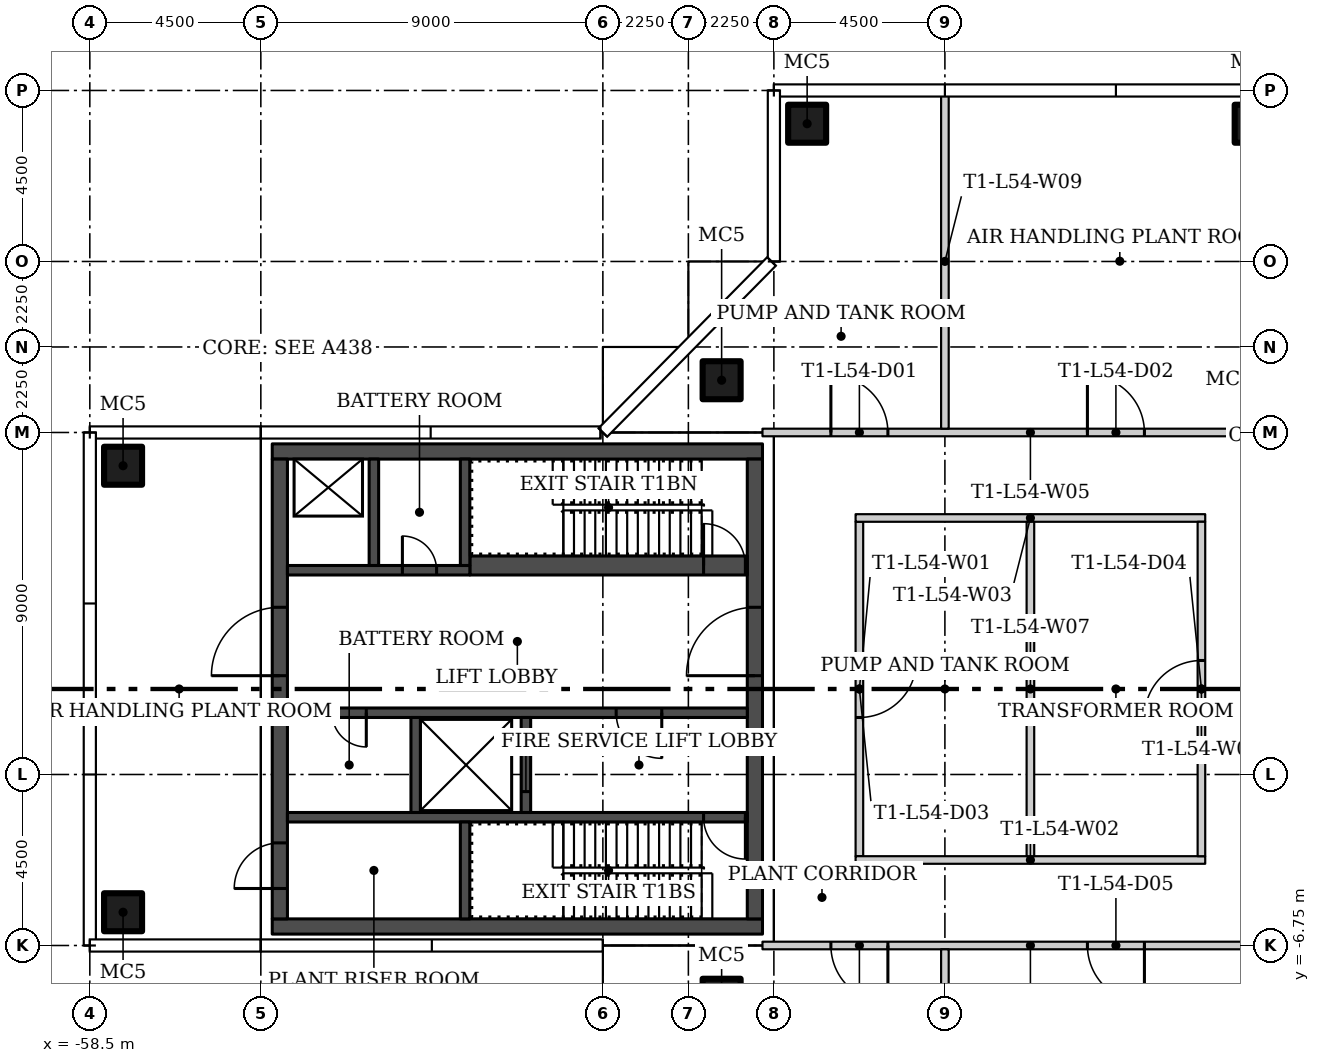
"""IFC4 building model, lengths in metres.
Left out: names, types, materials, properties, quantities, classifications, styles, units other than length and angle.
Written with IfcOpenShell. Run it as: python <this file> out.ifc"""

import sys

from ifc_helpers import new_model, si_unit, direction, frame, frame_2d, origin, origin_2d, place, context, subcontext, project, spatial, rectangle, hollow_rectangle, extrude, element, fill, save


model = new_model("IFC4")
c1 = context("Model", 3, precision=1e-05, world=origin(), true_north=direction((0.0, 1.0)))
c2 = subcontext(c1, "Body", "Model", "MODEL_VIEW")
j1 = project(units=[si_unit("LENGTHUNIT", "METRE"), si_unit("PLANEANGLEUNIT", "RADIAN")], contexts=[c1])
p1 = place(None, origin())
s1 = spatial("IfcSite", under=j1, at=p1, CompositionType="ELEMENT")
p2 = place(p1, origin())
s2 = spatial("IfcBuilding", under=s1, at=p2, CompositionType="ELEMENT")
p3 = place(p2, frame((0.0, 0.0, 225.6)))
s3 = spatial("IfcBuildingStorey", under=s2, at=p3, CompositionType="ELEMENT", Elevation=225.6)
for number, where in (
    (1, (-41.875, 8.125, 0.0)),
    (2, (-41.875, -8.125, 0.0)),
    (3, (-57.625, -5.875, 0.0)),
    (4, (-57.625, 5.875, 0.0)),
    (5, (-39.625, 14.875, 0.0)),
    (6, (-27.875, 14.875, 0.0)),
):
    element("IfcColumn", number, at=place(p3, frame(where)), inside=s3, PredefinedType="COLUMN", context=c2, shape_type="SweptSolid", body=[
        extrude(hollow_rectangle(XDim=1.0, YDim=1.0, WallThickness=0.04, at=origin_2d()), origin(), (0.0, 0.0, 1.0), 4.45),
    ])
p4 = place(p3, frame((-38.25, 4.4, 0.0), z_axis=(0.0, 0.0, 1.0), x_axis=(0.0, -1.0, 0.0)))
e7 = element("IfcWall", 7, at=p4, inside=s3, PredefinedType="PARTITIONING", context=c2, shape_type="SweptSolid", body=[
    extrude(rectangle(XDim=8.8, YDim=0.2, at=frame_2d((4.4, 0.0))), origin(), (0.0, 0.0, 1.0), 4.45),
])
p5 = place(p4, frame((3.65, 0.0, 0.0)))
e8 = element("IfcOpeningElement", 8, at=p5, cuts=e7, PredefinedType="OPENING", context=c2, shape_type="SweptSolid", body=[
    extrude(rectangle(XDim=1.5, YDim=2.4, at=frame_2d((0.75, 1.2))), frame((0.0, 0.11, 0.0), z_axis=(0.0, -1.0, 0.0), x_axis=(1.0, 0.0, 0.0)), (0.0, 0.0, 1.0), 0.22),
])
p6 = place(p3, frame((-38.35, -4.5, 0.0)))
e9 = element("IfcWall", 9, at=p6, inside=s3, PredefinedType="PARTITIONING", context=c2, shape_type="SweptSolid", body=[
    extrude(rectangle(XDim=9.2, YDim=0.2, at=frame_2d((4.6, 0.0))), origin(), (0.0, 0.0, 1.0), 4.45),
])
p7 = place(p3, frame((-29.15, 4.5, 0.0), z_axis=(0.0, 0.0, 1.0), x_axis=(-1.0, 0.0, 0.0)))
e10 = element("IfcWall", 10, at=p7, inside=s3, PredefinedType="PARTITIONING", context=c2, shape_type="SweptSolid", body=[
    extrude(rectangle(XDim=9.2, YDim=0.2, at=frame_2d((4.6, 0.0))), origin(), (0.0, 0.0, 1.0), 4.45),
])
p8 = place(p3, frame((-29.25, -4.4, 0.0), z_axis=(0.0, 0.0, 1.0), x_axis=(0.0, 1.0, 0.0)))
e11 = element("IfcWall", 11, at=p8, inside=s3, PredefinedType="PARTITIONING", context=c2, shape_type="SweptSolid", body=[
    extrude(rectangle(XDim=8.8, YDim=0.2, at=frame_2d((4.4, 0.0))), origin(), (0.0, 0.0, 1.0), 4.45),
])
p9 = place(p8, frame((3.65, 0.0, 0.0)))
e12 = element("IfcOpeningElement", 12, at=p9, cuts=e11, PredefinedType="OPENING", context=c2, shape_type="SweptSolid", body=[
    extrude(rectangle(XDim=1.5, YDim=2.4, at=frame_2d((0.75, 1.2))), frame((0.0, 0.11, 0.0), z_axis=(0.0, -1.0, 0.0), x_axis=(1.0, 0.0, 0.0)), (0.0, 0.0, 1.0), 0.22),
])
p10 = place(p3, frame((-40.8, 6.75, 0.0)))
e13 = element("IfcWall", 13, at=p10, inside=s3, PredefinedType="PARTITIONING", context=c2, shape_type="SweptSolid", body=[
    extrude(rectangle(XDim=14.1, YDim=0.2, at=frame_2d((7.05, 0.0))), origin(), (0.0, 0.0, 1.0), 4.45),
])
p11 = place(p10, frame((1.8, 0.0, 0.0)))
e14 = element("IfcOpeningElement", 14, at=p11, cuts=e13, PredefinedType="OPENING", context=c2, shape_type="SweptSolid", body=[
    extrude(rectangle(XDim=1.5, YDim=2.4, at=frame_2d((0.75, 1.2))), frame((0.0, 0.11, 0.0), z_axis=(0.0, -1.0, 0.0), x_axis=(1.0, 0.0, 0.0)), (0.0, 0.0, 1.0), 0.22),
])
p12 = place(p10, frame((8.55, 0.0, 0.0)))
e15 = element("IfcOpeningElement", 15, at=p12, cuts=e13, PredefinedType="OPENING", context=c2, shape_type="SweptSolid", body=[
    extrude(rectangle(XDim=1.5, YDim=2.4, at=frame_2d((0.75, 1.2))), frame((0.0, 0.11, 0.0), z_axis=(0.0, -1.0, 0.0), x_axis=(1.0, 0.0, 0.0)), (0.0, 0.0, 1.0), 0.22),
])
p13 = place(p3, frame((-26.7, -6.75, 0.0), z_axis=(0.0, 0.0, 1.0), x_axis=(-1.0, 0.0, 0.0)))
e16 = element("IfcWall", 16, at=p13, inside=s3, PredefinedType="PARTITIONING", context=c2, shape_type="SweptSolid", body=[
    extrude(rectangle(XDim=14.1, YDim=0.2, at=frame_2d((7.05, 0.0))), origin(), (0.0, 0.0, 1.0), 4.45),
])
p14 = place(p13, frame((4.05, 0.0, 0.0)))
e17 = element("IfcOpeningElement", 17, at=p14, cuts=e16, PredefinedType="OPENING", context=c2, shape_type="SweptSolid", body=[
    extrude(rectangle(XDim=1.5, YDim=2.4, at=frame_2d((0.75, 1.2))), frame((0.0, 0.11, 0.0), z_axis=(0.0, -1.0, 0.0), x_axis=(1.0, 0.0, 0.0)), (0.0, 0.0, 1.0), 0.22),
])
p15 = place(p13, frame((10.8, 0.0, 0.0)))
e18 = element("IfcOpeningElement", 18, at=p15, cuts=e16, PredefinedType="OPENING", context=c2, shape_type="SweptSolid", body=[
    extrude(rectangle(XDim=1.5, YDim=2.4, at=frame_2d((0.75, 1.2))), frame((0.0, 0.11, 0.0), z_axis=(0.0, -1.0, 0.0), x_axis=(1.0, 0.0, 0.0)), (0.0, 0.0, 1.0), 0.22),
])
p16 = place(p3, frame((-33.75, -4.4, 0.0), z_axis=(0.0, 0.0, 1.0), x_axis=(0.0, 1.0, 0.0)))
e19 = element("IfcWall", 19, at=p16, inside=s3, PredefinedType="PARTITIONING", context=c2, shape_type="SweptSolid", body=[
    extrude(rectangle(XDim=8.8, YDim=0.2, at=frame_2d((4.4, 0.0))), origin(), (0.0, 0.0, 1.0), 4.45),
])
p17 = place(p3, frame((-36.0, -20.155, 0.0), z_axis=(0.0, 0.0, 1.0), x_axis=(0.0, 1.0, 0.0)))
e20 = element("IfcWall", 20, at=p17, inside=s3, PredefinedType="PARTITIONING", context=c2, shape_type="SweptSolid", body=[
    extrude(rectangle(XDim=13.305, YDim=0.2, at=frame_2d((6.652, 0.0))), origin(), (0.0, 0.0, 1.0), 4.45),
])
p18 = place(p3, frame((-36.0, 6.85, 0.0), z_axis=(0.0, 0.0, 1.0), x_axis=(0.0, 1.0, 0.0)))
e21 = element("IfcWall", 21, at=p18, inside=s3, PredefinedType="PARTITIONING", context=c2, shape_type="SweptSolid", body=[
    extrude(rectangle(XDim=8.805, YDim=0.2, at=frame_2d((4.402, 0.0))), origin(), (0.0, 0.0, 1.0), 4.45),
])
for number, where, z_axis, x_axis in (
    (22, (-40.8, -6.25, 0.0), (0.0, 0.0, 1.0), (-1.0, 0.0, 0.0)),
    (23, (-40.8, 6.25, 0.0), (0.0, 0.0, 1.0), (-1.0, 0.0, 0.0)),
):
    element("IfcWall", number, at=place(p3, frame(where, z_axis=z_axis, x_axis=x_axis)), inside=s3, PredefinedType="SHEAR", context=c2, shape_type="SweptSolid", body=[
        extrude(rectangle(XDim=12.9, YDim=0.4, at=frame_2d((6.45, 0.0))), origin(), (0.0, 0.0, 1.0), 4.45),
    ])
p19 = place(p3, frame((-41.0, -6.05, 0.0), z_axis=(0.0, 0.0, 1.0), x_axis=(0.0, 1.0, 0.0)))
e24 = element("IfcWall", 24, at=p19, inside=s3, PredefinedType="SHEAR", context=c2, shape_type="SweptSolid", body=[
    extrude(rectangle(XDim=12.1, YDim=0.4, at=frame_2d((6.05, 0.0))), origin(), (0.0, 0.0, 1.0), 4.45),
])
p20 = place(p19, frame((6.4, 0.0, 0.0)))
e25 = element("IfcOpeningElement", 25, at=p20, cuts=e24, PredefinedType="OPENING", context=c2, shape_type="SweptSolid", body=[
    extrude(rectangle(XDim=1.8, YDim=2.4, at=frame_2d((0.9, 1.2))), frame((0.0, 0.21, 0.0), z_axis=(0.0, -1.0, 0.0), x_axis=(1.0, 0.0, 0.0)), (0.0, 0.0, 1.0), 0.42),
])
p21 = place(p3, frame((-53.5, -6.05, 0.0), z_axis=(0.0, 0.0, 1.0), x_axis=(0.0, 1.0, 0.0)))
e26 = element("IfcWall", 26, at=p21, inside=s3, PredefinedType="SHEAR", context=c2, shape_type="SweptSolid", body=[
    extrude(rectangle(XDim=12.1, YDim=0.4, at=frame_2d((6.05, 0.0))), origin(), (0.0, 0.0, 1.0), 4.45),
])
p22 = place(p21, frame((0.8, 0.0, 0.0)))
e27 = element("IfcOpeningElement", 27, at=p22, cuts=e26, PredefinedType="OPENING", context=c2, shape_type="SweptSolid", body=[
    extrude(rectangle(XDim=1.2, YDim=2.1, at=frame_2d((0.6, 1.05))), frame((0.0, 0.21, 0.0), z_axis=(0.0, -1.0, 0.0), x_axis=(1.0, 0.0, 0.0)), (0.0, 0.0, 1.0), 0.42),
])
p23 = place(p21, frame((6.4, 0.0, 0.0)))
e28 = element("IfcOpeningElement", 28, at=p23, cuts=e26, PredefinedType="OPENING", context=c2, shape_type="SweptSolid", body=[
    extrude(rectangle(XDim=1.8, YDim=2.4, at=frame_2d((0.9, 1.2))), frame((0.0, 0.21, 0.0), z_axis=(0.0, -1.0, 0.0), x_axis=(1.0, 0.0, 0.0)), (0.0, 0.0, 1.0), 0.42),
])
p24 = place(p3, frame((-41.2, -3.375, 0.0), z_axis=(0.0, 0.0, 1.0), x_axis=(-1.0, 0.0, 0.0)))
e29 = element("IfcWall", 29, at=p24, inside=s3, PredefinedType="SHEAR", context=c2, shape_type="SweptSolid", body=[
    extrude(rectangle(XDim=12.1, YDim=0.25, at=frame_2d((6.05, 0.0))), origin(), (0.0, 0.0, 1.0), 4.45),
])
p25 = place(p24, frame((0.05, 0.0, 0.0)))
e30 = element("IfcOpeningElement", 30, at=p25, cuts=e29, PredefinedType="OPENING", context=c2, shape_type="SweptSolid", body=[
    extrude(rectangle(XDim=1.1, YDim=2.1, at=frame_2d((0.55, 1.05))), frame((0.0, 0.135, 0.0), z_axis=(0.0, -1.0, 0.0), x_axis=(1.0, 0.0, 0.0)), (0.0, 0.0, 1.0), 0.27),
])
p26 = place(p3, frame((-48.625, -6.05, 0.0), z_axis=(0.0, 0.0, 1.0), x_axis=(0.0, 1.0, 0.0)))
e31 = element("IfcWall", 31, at=p26, inside=s3, PredefinedType="SHEAR", context=c2, shape_type="SweptSolid", body=[
    extrude(rectangle(XDim=2.55, YDim=0.25, at=frame_2d((1.275, 0.0))), origin(), (0.0, 0.0, 1.0), 4.45),
])
p27 = place(p3, frame((-41.2, -0.625, 0.0), z_axis=(0.0, 0.0, 1.0), x_axis=(-1.0, 0.0, 0.0)))
e32 = element("IfcWall", 32, at=p27, inside=s3, PredefinedType="SHEAR", context=c2, shape_type="SweptSolid", body=[
    extrude(rectangle(XDim=12.1, YDim=0.25, at=frame_2d((6.05, 0.0))), origin(), (0.0, 0.0, 1.0), 4.45),
])
p28 = place(p27, frame((2.25, 0.0, 0.0)))
e33 = element("IfcOpeningElement", 33, at=p28, cuts=e32, PredefinedType="OPENING", context=c2, shape_type="SweptSolid", body=[
    extrude(rectangle(XDim=1.2, YDim=2.1, at=frame_2d((0.6, 1.05))), frame((0.0, 0.135, 0.0), z_axis=(0.0, -1.0, 0.0), x_axis=(1.0, 0.0, 0.0)), (0.0, 0.0, 1.0), 0.27),
])
p29 = place(p27, frame((10.025, 0.0, 0.0)))
e34 = element("IfcOpeningElement", 34, at=p29, cuts=e32, PredefinedType="OPENING", context=c2, shape_type="SweptSolid", body=[
    extrude(rectangle(XDim=0.9, YDim=2.1, at=frame_2d((0.45, 1.05))), frame((0.0, 0.135, 0.0), z_axis=(0.0, -1.0, 0.0), x_axis=(1.0, 0.0, 0.0)), (0.0, 0.0, 1.0), 0.27),
])
p30 = place(p3, frame((-47.025, -3.25, 0.0), z_axis=(0.0, 0.0, 1.0), x_axis=(0.0, 1.0, 0.0)))
e35 = element("IfcWall", 35, at=p30, inside=s3, PredefinedType="SHEAR", context=c2, shape_type="SweptSolid", body=[
    extrude(rectangle(XDim=2.5, YDim=0.25, at=frame_2d((1.25, 0.0))), origin(), (0.0, 0.0, 1.0), 4.45),
])
p31 = place(p30, frame((0.55, 0.0, 0.0)))
e36 = element("IfcOpeningElement", 36, at=p31, cuts=e35, PredefinedType="OPENING", context=c2, shape_type="SweptSolid", body=[
    extrude(rectangle(XDim=1.4, YDim=2.4, at=frame_2d((0.7, 1.2))), frame((0.0, 0.135, 0.0), z_axis=(0.0, -1.0, 0.0), x_axis=(1.0, 0.0, 0.0)), (0.0, 0.0, 1.0), 0.27),
])
p32 = place(p3, frame((-49.925, -3.25, 0.0), z_axis=(0.0, 0.0, 1.0), x_axis=(0.0, 1.0, 0.0)))
e37 = element("IfcWall", 37, at=p32, inside=s3, PredefinedType="SHEAR", context=c2, shape_type="SweptSolid", body=[
    extrude(rectangle(XDim=2.5, YDim=0.25, at=frame_2d((1.25, 0.0))), origin(), (0.0, 0.0, 1.0), 4.45),
])
p33 = place(p3, frame((-48.5, 3.25, 0.0)))
e38 = element("IfcWall", 38, at=p33, inside=s3, PredefinedType="SHEAR", context=c2, shape_type="SweptSolid", body=[
    extrude(rectangle(XDim=7.3, YDim=0.5, at=frame_2d((3.65, 0.0))), origin(), (0.0, 0.0, 1.0), 4.45),
])
p34 = place(p33, frame((6.15, 0.0, 0.0)))
e39 = element("IfcOpeningElement", 39, at=p34, cuts=e38, PredefinedType="OPENING", context=c2, shape_type="SweptSolid", body=[
    extrude(rectangle(XDim=1.1, YDim=2.1, at=frame_2d((0.55, 1.05))), frame((0.0, 0.26, 0.0), z_axis=(0.0, -1.0, 0.0), x_axis=(1.0, 0.0, 0.0)), (0.0, 0.0, 1.0), 0.52),
])
p35 = place(p3, frame((-53.3, 3.125, 0.0)))
e40 = element("IfcWall", 40, at=p35, inside=s3, PredefinedType="SHEAR", context=c2, shape_type="SweptSolid", body=[
    extrude(rectangle(XDim=4.8, YDim=0.25, at=frame_2d((2.4, 0.0))), origin(), (0.0, 0.0, 1.0), 4.45),
])
p36 = place(p35, frame((3.025, 0.0, 0.0)))
e41 = element("IfcOpeningElement", 41, at=p36, cuts=e40, PredefinedType="OPENING", context=c2, shape_type="SweptSolid", body=[
    extrude(rectangle(XDim=0.9, YDim=2.1, at=frame_2d((0.45, 1.05))), frame((0.0, 0.135, 0.0), z_axis=(0.0, -1.0, 0.0), x_axis=(1.0, 0.0, 0.0)), (0.0, 0.0, 1.0), 0.27),
])
for number, where, z_axis, x_axis in (
    (42, (-48.625, 3.25, 0.0), (0.0, 0.0, 1.0), (0.0, 1.0, 0.0)),
    (43, (-51.025, 3.25, 0.0), (0.0, 0.0, 1.0), (0.0, 1.0, 0.0)),
):
    element("IfcWall", number, at=place(p3, frame(where, z_axis=z_axis, x_axis=x_axis)), inside=s3, PredefinedType="SHEAR", context=c2, shape_type="SweptSolid", body=[
        extrude(rectangle(XDim=2.8, YDim=0.25, at=frame_2d((1.4, 0.0))), origin(), (0.0, 0.0, 1.0), 4.45),
    ])
p37 = place(p11, origin())
e44 = element("IfcDoor", 44, at=p37, inside=s3, OperationType="DOUBLE_DOOR_SINGLE_SWING", PredefinedType="DOOR", context=c2, shape_type="SweptSolid", body=[
    extrude(rectangle(XDim=1.5, YDim=2.4, at=frame_2d((0.75, 1.2))), frame((0.0, 0.025, 0.0), z_axis=(0.0, -1.0, 0.0), x_axis=(1.0, 0.0, 0.0)), (0.0, 0.0, 1.0), 0.05),
])
fill(e14, e44)
p38 = place(p12, origin())
e45 = element("IfcDoor", 45, at=p38, inside=s3, OperationType="DOUBLE_DOOR_SINGLE_SWING", PredefinedType="DOOR", context=c2, shape_type="SweptSolid", body=[
    extrude(rectangle(XDim=1.5, YDim=2.4, at=frame_2d((0.75, 1.2))), frame((0.0, 0.025, 0.0), z_axis=(0.0, -1.0, 0.0), x_axis=(1.0, 0.0, 0.0)), (0.0, 0.0, 1.0), 0.05),
])
fill(e15, e45)
p39 = place(p5, origin())
e46 = element("IfcDoor", 46, at=p39, inside=s3, OperationType="DOUBLE_DOOR_SINGLE_SWING", PredefinedType="DOOR", context=c2, shape_type="SweptSolid", body=[
    extrude(rectangle(XDim=1.5, YDim=2.4, at=frame_2d((0.75, 1.2))), frame((0.0, 0.025, 0.0), z_axis=(0.0, -1.0, 0.0), x_axis=(1.0, 0.0, 0.0)), (0.0, 0.0, 1.0), 0.05),
])
fill(e8, e46)
p40 = place(p9, origin())
e47 = element("IfcDoor", 47, at=p40, inside=s3, OperationType="DOUBLE_DOOR_SINGLE_SWING", PredefinedType="DOOR", context=c2, shape_type="SweptSolid", body=[
    extrude(rectangle(XDim=1.5, YDim=2.4, at=frame_2d((0.75, 1.2))), frame((0.0, 0.025, 0.0), z_axis=(0.0, -1.0, 0.0), x_axis=(1.0, 0.0, 0.0)), (0.0, 0.0, 1.0), 0.05),
])
fill(e12, e47)
p41 = place(p14, origin())
e48 = element("IfcDoor", 48, at=p41, inside=s3, OperationType="DOUBLE_DOOR_SINGLE_SWING", PredefinedType="DOOR", context=c2, shape_type="SweptSolid", body=[
    extrude(rectangle(XDim=1.5, YDim=2.4, at=frame_2d((0.75, 1.2))), frame((0.0, 0.025, 0.0), z_axis=(0.0, -1.0, 0.0), x_axis=(1.0, 0.0, 0.0)), (0.0, 0.0, 1.0), 0.05),
])
fill(e17, e48)
p42 = place(p15, origin())
e49 = element("IfcDoor", 49, at=p42, inside=s3, OperationType="DOUBLE_DOOR_SINGLE_SWING", PredefinedType="DOOR", context=c2, shape_type="SweptSolid", body=[
    extrude(rectangle(XDim=1.5, YDim=2.4, at=frame_2d((0.75, 1.2))), frame((0.0, 0.025, 0.0), z_axis=(0.0, -1.0, 0.0), x_axis=(1.0, 0.0, 0.0)), (0.0, 0.0, 1.0), 0.05),
])
fill(e18, e49)
p43 = place(p20, origin())
e50 = element("IfcDoor", 50, at=p43, inside=s3, OperationType="DOUBLE_DOOR_SINGLE_SWING", PredefinedType="DOOR", context=c2, shape_type="SweptSolid", body=[
    extrude(rectangle(XDim=1.8, YDim=2.4, at=frame_2d((0.9, 1.2))), frame((0.0, 0.025, 0.0), z_axis=(0.0, -1.0, 0.0), x_axis=(1.0, 0.0, 0.0)), (0.0, 0.0, 1.0), 0.05),
])
fill(e25, e50)
p44 = place(p22, origin())
e51 = element("IfcDoor", 51, at=p44, inside=s3, OperationType="SINGLE_SWING_LEFT", PredefinedType="DOOR", context=c2, shape_type="SweptSolid", body=[
    extrude(rectangle(XDim=1.2, YDim=2.1, at=frame_2d((0.6, 1.05))), frame((0.0, 0.025, 0.0), z_axis=(0.0, -1.0, 0.0), x_axis=(1.0, 0.0, 0.0)), (0.0, 0.0, 1.0), 0.05),
])
fill(e27, e51)
p45 = place(p23, origin())
e52 = element("IfcDoor", 52, at=p45, inside=s3, OperationType="DOUBLE_DOOR_SINGLE_SWING", PredefinedType="DOOR", context=c2, shape_type="SweptSolid", body=[
    extrude(rectangle(XDim=1.8, YDim=2.4, at=frame_2d((0.9, 1.2))), frame((0.0, 0.025, 0.0), z_axis=(0.0, -1.0, 0.0), x_axis=(1.0, 0.0, 0.0)), (0.0, 0.0, 1.0), 0.05),
])
fill(e28, e52)
p46 = place(p25, origin())
e53 = element("IfcDoor", 53, at=p46, inside=s3, OperationType="SINGLE_SWING_LEFT", PredefinedType="DOOR", context=c2, shape_type="SweptSolid", body=[
    extrude(rectangle(XDim=1.1, YDim=2.1, at=frame_2d((0.55, 1.05))), frame((0.0, 0.025, 0.0), z_axis=(0.0, -1.0, 0.0), x_axis=(1.0, 0.0, 0.0)), (0.0, 0.0, 1.0), 0.05),
])
fill(e30, e53)
p47 = place(p28, origin())
e54 = element("IfcDoor", 54, at=p47, inside=s3, OperationType="SINGLE_SWING_LEFT", PredefinedType="DOOR", context=c2, shape_type="SweptSolid", body=[
    extrude(rectangle(XDim=1.2, YDim=2.1, at=frame_2d((0.6, 1.05))), frame((0.0, 0.025, 0.0), z_axis=(0.0, -1.0, 0.0), x_axis=(1.0, 0.0, 0.0)), (0.0, 0.0, 1.0), 0.05),
])
fill(e33, e54)
p48 = place(p29, origin())
e55 = element("IfcDoor", 55, at=p48, inside=s3, OperationType="SINGLE_SWING_RIGHT", PredefinedType="DOOR", context=c2, shape_type="SweptSolid", body=[
    extrude(rectangle(XDim=0.9, YDim=2.1, at=frame_2d((0.45, 1.05))), frame((0.0, 0.025, 0.0), z_axis=(0.0, -1.0, 0.0), x_axis=(1.0, 0.0, 0.0)), (0.0, 0.0, 1.0), 0.05),
])
fill(e34, e55)
p49 = place(p31, origin())
e56 = element("IfcDoor", 56, at=p49, inside=s3, OperationType="SLIDING_TO_LEFT", PredefinedType="DOOR", context=c2, shape_type="SweptSolid", body=[
    extrude(rectangle(XDim=1.4, YDim=2.4, at=frame_2d((0.7, 1.2))), frame((0.0, 0.025, 0.0), z_axis=(0.0, -1.0, 0.0), x_axis=(1.0, 0.0, 0.0)), (0.0, 0.0, 1.0), 0.05),
])
fill(e36, e56)
p50 = place(p34, origin())
e57 = element("IfcDoor", 57, at=p50, inside=s3, OperationType="SINGLE_SWING_RIGHT", PredefinedType="DOOR", context=c2, shape_type="SweptSolid", body=[
    extrude(rectangle(XDim=1.1, YDim=2.1, at=frame_2d((0.55, 1.05))), frame((0.0, 0.025, 0.0), z_axis=(0.0, -1.0, 0.0), x_axis=(1.0, 0.0, 0.0)), (0.0, 0.0, 1.0), 0.05),
])
fill(e39, e57)
p51 = place(p36, origin())
e58 = element("IfcDoor", 58, at=p51, inside=s3, OperationType="SINGLE_SWING_RIGHT", PredefinedType="DOOR", context=c2, shape_type="SweptSolid", body=[
    extrude(rectangle(XDim=0.9, YDim=2.1, at=frame_2d((0.45, 1.05))), frame((0.0, 0.025, 0.0), z_axis=(0.0, -1.0, 0.0), x_axis=(1.0, 0.0, 0.0)), (0.0, 0.0, 1.0), 0.05),
])
fill(e41, e58)
save(model, sys.argv[1])
